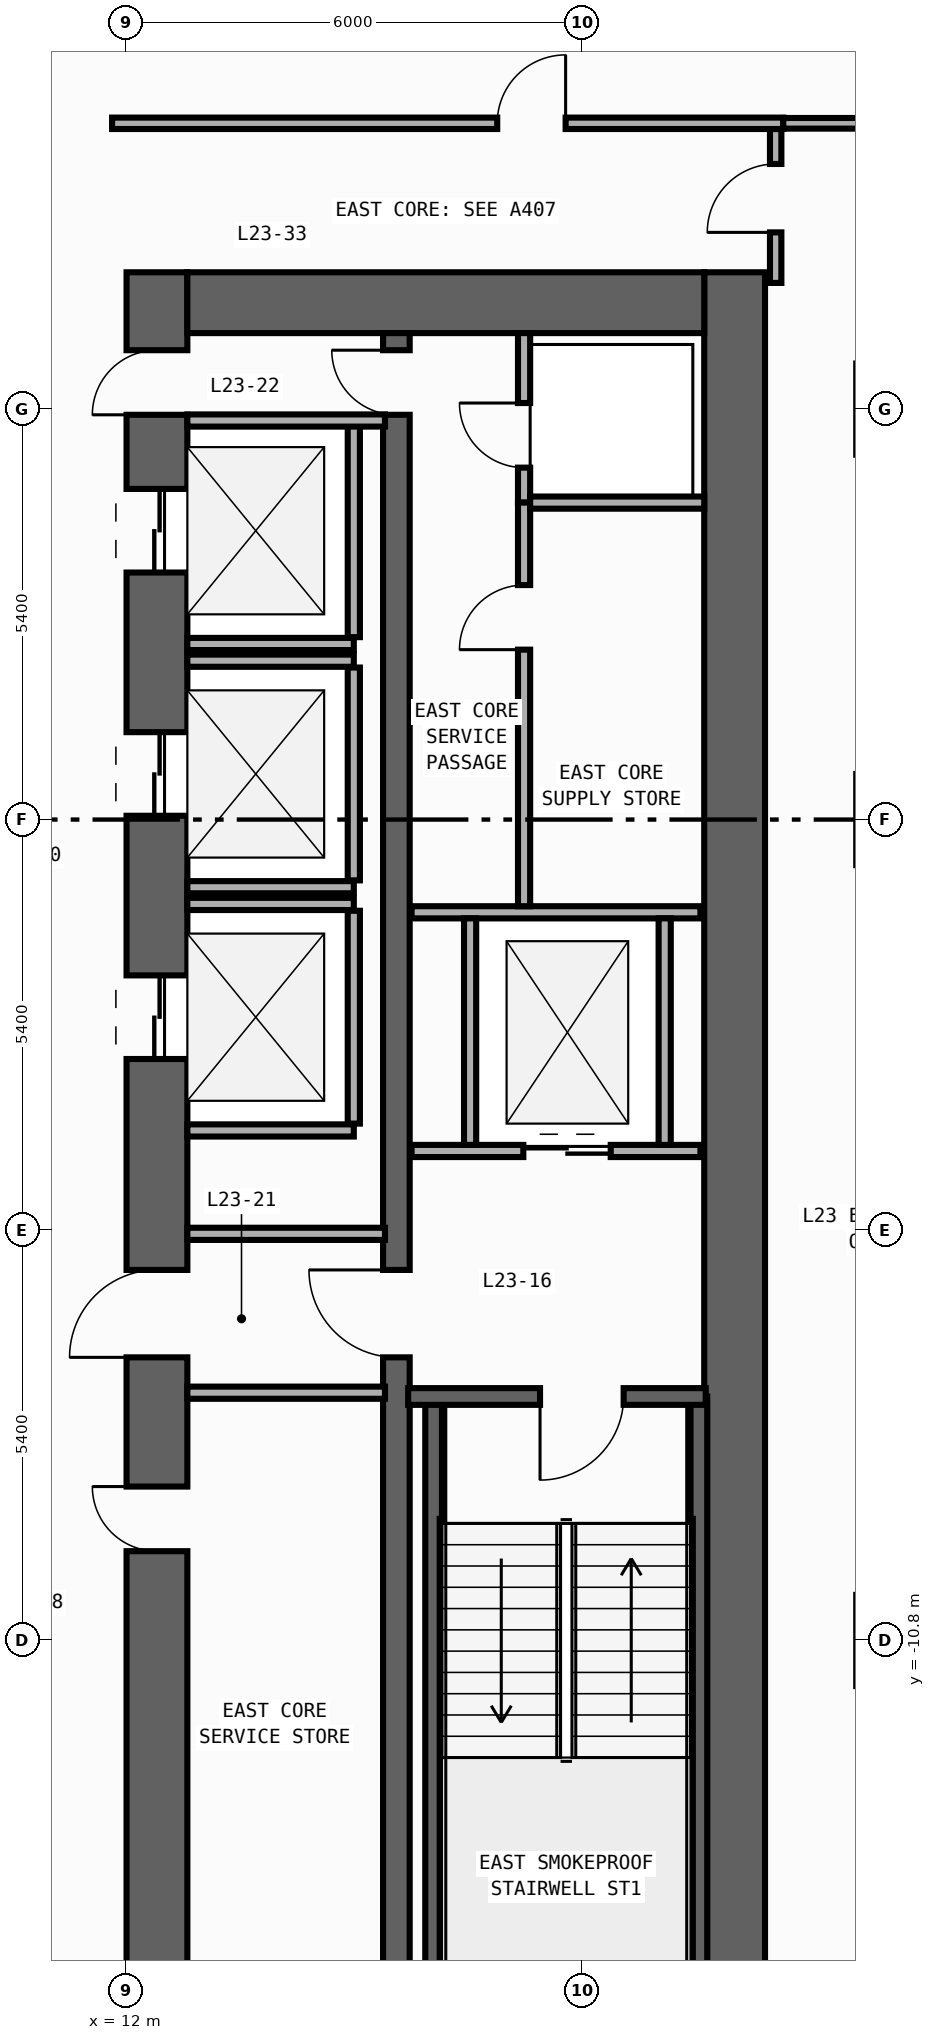
"""IFC4 building model, lengths in metres.
Left out: names, types, materials, properties, quantities, classifications, styles, units other than length and angle.
Written with IfcOpenShell. Run it as: python <this file> out.ifc"""

import sys

from ifc_helpers import new_model, si_unit, direction, frame, frame_2d, origin, origin_2d, place, context, subcontext, project, spatial, rectangle, extrude, element, fill, save


model = new_model("IFC4")
c1 = context("Model", 3, precision=1e-05, world=origin(), true_north=direction((0.0, 1.0)))
c2 = subcontext(c1, "Body", "Model", "MODEL_VIEW")
j1 = project(units=[si_unit("LENGTHUNIT", "METRE"), si_unit("PLANEANGLEUNIT", "RADIAN")], contexts=[c1])
p1 = place(None, origin())
s1 = spatial("IfcSite", under=j1, at=p1, CompositionType="ELEMENT")
p2 = place(p1, origin())
s2 = spatial("IfcBuilding", under=s1, at=p2, CompositionType="ELEMENT")
p3 = place(p2, frame((0.0, 0.0, 101.6)))
s3 = spatial("IfcBuildingStorey", under=s2, at=p3, CompositionType="ELEMENT", Elevation=101.6)
p4 = place(p3, frame((12.4, -19.8, 0.0), z_axis=(0.0, 0.0, 1.0), x_axis=(0.0, 1.0, 0.0)))
e1 = element("IfcWall", 1, at=p4, inside=s3, PredefinedType="SHEAR", context=c2, shape_type="SweptSolid", body=[
    extrude(rectangle(XDim=27.0, YDim=0.8, at=frame_2d((13.5, 0.0))), origin(), (0.0, 0.0, 1.0), 3.94),
])
p5 = place(p4, frame((23.05, 0.0, 0.0)))
e2 = element("IfcOpeningElement", 2, at=p5, cuts=e1, PredefinedType="OPENING", context=c2, shape_type="SweptSolid", body=[
    extrude(rectangle(XDim=1.1, YDim=2.2, at=frame_2d((0.55, 1.1))), frame((0.0, 0.41, 0.0), z_axis=(0.0, -1.0, 0.0), x_axis=(1.0, 0.0, 0.0)), (0.0, 0.0, 1.0), 0.82),
])
p6 = place(p4, frame((19.85, 0.0, 0.0)))
e3 = element("IfcOpeningElement", 3, at=p6, cuts=e1, PredefinedType="OPENING", context=c2, shape_type="SweptSolid", body=[
    extrude(rectangle(XDim=1.1, YDim=2.2, at=frame_2d((0.55, 1.1))), frame((0.0, 0.41, 0.0), z_axis=(0.0, -1.0, 0.0), x_axis=(1.0, 0.0, 0.0)), (0.0, 0.0, 1.0), 0.82),
])
p7 = place(p4, frame((16.65, 0.0, 0.0)))
e4 = element("IfcOpeningElement", 4, at=p7, cuts=e1, PredefinedType="OPENING", context=c2, shape_type="SweptSolid", body=[
    extrude(rectangle(XDim=1.1, YDim=2.2, at=frame_2d((0.55, 1.1))), frame((0.0, 0.41, 0.0), z_axis=(0.0, -1.0, 0.0), x_axis=(1.0, 0.0, 0.0)), (0.0, 0.0, 1.0), 0.82),
])
p8 = place(p4, frame((10.175, 0.0, 0.0)))
e5 = element("IfcOpeningElement", 5, at=p8, cuts=e1, PredefinedType="OPENING", context=c2, shape_type="SweptSolid", body=[
    extrude(rectangle(XDim=0.85, YDim=2.1, at=frame_2d((0.425, 1.05))), frame((0.0, 0.41, 0.0), z_axis=(0.0, -1.0, 0.0), x_axis=(1.0, 0.0, 0.0)), (0.0, 0.0, 1.0), 0.82),
])
p9 = place(p4, frame((12.725, 0.0, 0.0)))
e6 = element("IfcOpeningElement", 6, at=p9, cuts=e1, PredefinedType="OPENING", context=c2, shape_type="SweptSolid", body=[
    extrude(rectangle(XDim=1.15, YDim=2.2, at=frame_2d((0.575, 1.1))), frame((0.0, 0.41, 0.0), z_axis=(0.0, -1.0, 0.0), x_axis=(1.0, 0.0, 0.0)), (0.0, 0.0, 1.0), 0.82),
])
p10 = place(p4, frame((25.125, 0.0, 0.0)))
e7 = element("IfcOpeningElement", 7, at=p10, cuts=e1, PredefinedType="OPENING", context=c2, shape_type="SweptSolid", body=[
    extrude(rectangle(XDim=0.85, YDim=2.1, at=frame_2d((0.425, 1.05))), frame((0.0, 0.41, 0.0), z_axis=(0.0, -1.0, 0.0), x_axis=(1.0, 0.0, 0.0)), (0.0, 0.0, 1.0), 0.82),
])
p11 = place(p3, frame((20.0, -19.8, 0.0), z_axis=(0.0, 0.0, 1.0), x_axis=(0.0, 1.0, 0.0)))
e8 = element("IfcWall", 8, at=p11, inside=s3, PredefinedType="SHEAR", context=c2, shape_type="SweptSolid", body=[
    extrude(rectangle(XDim=27.0, YDim=0.8, at=frame_2d((13.5, 0.0))), origin(), (0.0, 0.0, 1.0), 3.94),
])
p12 = place(p3, frame((12.8, 6.8, 0.0), z_axis=(0.0, 0.0, 1.0), x_axis=(1.0, 0.0, 0.0)))
e9 = element("IfcWall", 9, at=p12, inside=s3, PredefinedType="SHEAR", context=c2, shape_type="SweptSolid", body=[
    extrude(rectangle(XDim=6.8, YDim=0.8, at=frame_2d((3.4, 0.0))), origin(), (0.0, 0.0, 1.0), 3.94),
])
p13 = place(p3, frame((15.55, -19.0, 0.0), z_axis=(0.0, 0.0, 1.0), x_axis=(0.0, 1.0, 0.0)))
e10 = element("IfcWall", 10, at=p13, inside=s3, PredefinedType="SHEAR", context=c2, shape_type="SweptSolid", body=[
    extrude(rectangle(XDim=25.4, YDim=0.35, at=frame_2d((12.7, 0.0))), origin(), (0.0, 0.0, 1.0), 3.94),
])
p14 = place(p13, frame((11.925, 0.0, 0.0)))
e11 = element("IfcOpeningElement", 11, at=p14, cuts=e10, PredefinedType="OPENING", context=c2, shape_type="SweptSolid", body=[
    extrude(rectangle(XDim=1.15, YDim=2.2, at=frame_2d((0.575, 1.1))), frame((0.0, 0.185, 0.0), z_axis=(0.0, -1.0, 0.0), x_axis=(1.0, 0.0, 0.0)), (0.0, 0.0, 1.0), 0.37),
])
p15 = place(p13, frame((24.325, 0.0, 0.0)))
e12 = element("IfcOpeningElement", 12, at=p15, cuts=e10, PredefinedType="OPENING", context=c2, shape_type="SweptSolid", body=[
    extrude(rectangle(XDim=0.85, YDim=2.1, at=frame_2d((0.425, 1.05))), frame((0.0, 0.185, 0.0), z_axis=(0.0, -1.0, 0.0), x_axis=(1.0, 0.0, 0.0)), (0.0, 0.0, 1.0), 0.37),
])
for number, where, z_axis, x_axis in (
    (13, (16.04, -18.89, 0.0), (0.0, 0.0, 1.0), (0.0, 1.0, 0.0)),
    (14, (19.53, -18.89, 0.0), (0.0, 0.0, 1.0), (0.0, 1.0, 0.0)),
):
    element("IfcWall", number, at=place(p3, frame(where, z_axis=z_axis, x_axis=x_axis)), inside=s3, PredefinedType="SHEAR", context=c2, shape_type="SweptSolid", body=[
        extrude(rectangle(XDim=11.3, YDim=0.22, at=frame_2d((5.65, 0.0))), origin(), (0.0, 0.0, 1.0), 3.94),
    ])
p16 = place(p3, frame((19.62, -7.59, 0.0), z_axis=(0.0, 0.0, 1.0), x_axis=(-1.0, 0.0, 0.0)))
e15 = element("IfcWall", 15, at=p16, inside=s3, PredefinedType="SHEAR", context=c2, shape_type="SweptSolid", body=[
    extrude(rectangle(XDim=3.915, YDim=0.22, at=frame_2d((1.958, 0.0))), origin(), (0.0, 0.0, 1.0), 3.94),
])
p17 = place(p16, frame((1.08, 0.0, 0.0)))
e16 = element("IfcOpeningElement", 16, at=p17, cuts=e15, PredefinedType="OPENING", context=c2, shape_type="SweptSolid", body=[
    extrude(rectangle(XDim=1.1, YDim=2.2, at=frame_2d((0.55, 1.1))), frame((0.0, 0.12, 0.0), z_axis=(0.0, -1.0, 0.0), x_axis=(1.0, 0.0, 0.0)), (0.0, 0.0, 1.0), 0.24),
])
for number, where, z_axis, x_axis in (
    (17, (22.2, -10.8, 0.0), (0.0, 0.0, 1.0), (1.0, 0.0, 0.0)),
    (18, (22.2, 0.0, 0.0), (0.0, 0.0, 1.0), (1.0, 0.0, 0.0)),
    (19, (22.2, 5.4, 0.0), (0.0, 0.0, 1.0), (1.0, 0.0, 0.0)),
):
    element("IfcColumn", number, at=place(p3, frame(where, z_axis=z_axis, x_axis=x_axis)), inside=s3, PredefinedType="COLUMN", context=c2, shape_type="SweptSolid", body=[
        extrude(rectangle(XDim=1.2, YDim=1.2, at=origin_2d()), origin(), (0.0, 0.0, 1.0), 4.2),
    ])
p18 = place(p3, frame((12.8, 2.31, 0.0), z_axis=(0.0, 0.0, 1.0), x_axis=(1.0, 0.0, 0.0)))
e20 = element("IfcWall", 20, at=p18, inside=s3, PredefinedType="STANDARD", context=c2, shape_type="SweptSolid", body=[
    extrude(rectangle(XDim=2.19, YDim=0.16, at=frame_2d((1.095, 0.0))), origin(), (0.0, 0.0, 1.0), 3.94),
])
p19 = place(p3, frame((14.99, 2.4, 0.0), z_axis=(0.0, 0.0, 1.0), x_axis=(0.0, 1.0, 0.0)))
e21 = element("IfcWall", 21, at=p19, inside=s3, PredefinedType="STANDARD", context=c2, shape_type="SweptSolid", body=[
    extrude(rectangle(XDim=2.8, YDim=0.16, at=frame_2d((1.4, 0.0))), origin(), (0.0, 0.0, 1.0), 3.94),
])
for number, where, z_axis, x_axis in (
    (22, (12.8, -0.89, 0.0), (0.0, 0.0, 1.0), (1.0, 0.0, 0.0)),
    (23, (12.8, 2.09, 0.0), (0.0, 0.0, 1.0), (1.0, 0.0, 0.0)),
):
    element("IfcWall", number, at=place(p3, frame(where, z_axis=z_axis, x_axis=x_axis)), inside=s3, PredefinedType="STANDARD", context=c2, shape_type="SweptSolid", body=[
        extrude(rectangle(XDim=2.19, YDim=0.16, at=frame_2d((1.095, 0.0))), origin(), (0.0, 0.0, 1.0), 3.94),
    ])
p20 = place(p3, frame((14.99, -0.8, 0.0), z_axis=(0.0, 0.0, 1.0), x_axis=(0.0, 1.0, 0.0)))
e24 = element("IfcWall", 24, at=p20, inside=s3, PredefinedType="STANDARD", context=c2, shape_type="SweptSolid", body=[
    extrude(rectangle(XDim=2.8, YDim=0.16, at=frame_2d((1.4, 0.0))), origin(), (0.0, 0.0, 1.0), 3.94),
])
for number, where, z_axis, x_axis in (
    (25, (12.8, -4.09, 0.0), (0.0, 0.0, 1.0), (1.0, 0.0, 0.0)),
    (26, (12.8, -1.11, 0.0), (0.0, 0.0, 1.0), (1.0, 0.0, 0.0)),
):
    element("IfcWall", number, at=place(p3, frame(where, z_axis=z_axis, x_axis=x_axis)), inside=s3, PredefinedType="STANDARD", context=c2, shape_type="SweptSolid", body=[
        extrude(rectangle(XDim=2.19, YDim=0.16, at=frame_2d((1.095, 0.0))), origin(), (0.0, 0.0, 1.0), 3.94),
    ])
p21 = place(p3, frame((14.99, -4.0, 0.0), z_axis=(0.0, 0.0, 1.0), x_axis=(0.0, 1.0, 0.0)))
e27 = element("IfcWall", 27, at=p21, inside=s3, PredefinedType="STANDARD", context=c2, shape_type="SweptSolid", body=[
    extrude(rectangle(XDim=2.8, YDim=0.16, at=frame_2d((1.4, 0.0))), origin(), (0.0, 0.0, 1.0), 3.94),
])
p22 = place(p3, frame((15.75, -4.36, 0.0), z_axis=(0.0, 0.0, 1.0), x_axis=(1.0, 0.0, 0.0)))
e28 = element("IfcWall", 28, at=p22, inside=s3, PredefinedType="STANDARD", context=c2, shape_type="SweptSolid", body=[
    extrude(rectangle(XDim=3.8, YDim=0.16, at=frame_2d((1.9, 0.0))), origin(), (0.0, 0.0, 1.0), 3.94),
])
p23 = place(p22, frame((1.47, 0.0, 0.0)))
e29 = element("IfcOpeningElement", 29, at=p23, cuts=e28, PredefinedType="OPENING", context=c2, shape_type="SweptSolid", body=[
    extrude(rectangle(XDim=1.15, YDim=2.2, at=frame_2d((0.575, 1.1))), frame((0.0, 0.09, 0.0), z_axis=(0.0, -1.0, 0.0), x_axis=(1.0, 0.0, 0.0)), (0.0, 0.0, 1.0), 0.18),
])
p24 = place(p3, frame((15.75, -1.22, 0.0), z_axis=(0.0, 0.0, 1.0), x_axis=(1.0, 0.0, 0.0)))
e30 = element("IfcWall", 30, at=p24, inside=s3, PredefinedType="STANDARD", context=c2, shape_type="SweptSolid", body=[
    extrude(rectangle(XDim=3.8, YDim=0.16, at=frame_2d((1.9, 0.0))), origin(), (0.0, 0.0, 1.0), 3.94),
])
for number, where, z_axis, x_axis in (
    (31, (16.52, -4.28, 0.0), (0.0, 0.0, 1.0), (0.0, 1.0, 0.0)),
    (32, (19.08, -4.28, 0.0), (0.0, 0.0, 1.0), (0.0, 1.0, 0.0)),
):
    element("IfcWall", number, at=place(p3, frame(where, z_axis=z_axis, x_axis=x_axis)), inside=s3, PredefinedType="STANDARD", context=c2, shape_type="SweptSolid", body=[
        extrude(rectangle(XDim=2.98, YDim=0.16, at=frame_2d((1.49, 0.0))), origin(), (0.0, 0.0, 1.0), 3.94),
    ])
for number, where, z_axis, x_axis in (
    (33, (12.8, -5.45, 0.0), (0.0, 0.0, 1.0), (1.0, 0.0, 0.0)),
    (34, (12.8, -7.54, 0.0), (0.0, 0.0, 1.0), (1.0, 0.0, 0.0)),
    (35, (12.8, 5.25, 0.0), (0.0, 0.0, 1.0), (1.0, 0.0, 0.0)),
):
    element("IfcWall", number, at=place(p3, frame(where, z_axis=z_axis, x_axis=x_axis)), inside=s3, PredefinedType="STANDARD", context=c2, shape_type="SweptSolid", body=[
        extrude(rectangle(XDim=2.6, YDim=0.16, at=frame_2d((1.3, 0.0))), origin(), (0.0, 0.0, 1.0), 3.94),
    ])
p25 = place(p3, frame((17.23, 4.17, 0.0), z_axis=(0.0, 0.0, 1.0), x_axis=(0.0, 1.0, 0.0)))
e36 = element("IfcWall", 36, at=p25, inside=s3, PredefinedType="PARTITIONING", context=c2, shape_type="SweptSolid", body=[
    extrude(rectangle(XDim=2.23, YDim=0.16, at=frame_2d((1.115, 0.0))), origin(), (0.0, 0.0, 1.0), 3.94),
])
p26 = place(p25, frame((0.46, 0.0, 0.0)))
e37 = element("IfcOpeningElement", 37, at=p26, cuts=e36, PredefinedType="OPENING", context=c2, shape_type="SweptSolid", body=[
    extrude(rectangle(XDim=0.85, YDim=2.1, at=frame_2d((0.425, 1.05))), frame((0.0, 0.09, 0.0), z_axis=(0.0, -1.0, 0.0), x_axis=(1.0, 0.0, 0.0)), (0.0, 0.0, 1.0), 0.18),
])
p27 = place(p3, frame((17.23, -1.14, 0.0), z_axis=(0.0, 0.0, 1.0), x_axis=(0.0, 1.0, 0.0)))
e38 = element("IfcWall", 38, at=p27, inside=s3, PredefinedType="PARTITIONING", context=c2, shape_type="SweptSolid", body=[
    extrude(rectangle(XDim=5.31, YDim=0.16, at=frame_2d((2.655, 0.0))), origin(), (0.0, 0.0, 1.0), 3.94),
])
p28 = place(p27, frame((3.375, 0.0, 0.0)))
e39 = element("IfcOpeningElement", 39, at=p28, cuts=e38, PredefinedType="OPENING", context=c2, shape_type="SweptSolid", body=[
    extrude(rectangle(XDim=0.85, YDim=2.1, at=frame_2d((0.425, 1.05))), frame((0.0, 0.09, 0.0), z_axis=(0.0, -1.0, 0.0), x_axis=(1.0, 0.0, 0.0)), (0.0, 0.0, 1.0), 0.18),
])
p29 = place(p3, frame((17.31, 4.17, 0.0), z_axis=(0.0, 0.0, 1.0), x_axis=(1.0, 0.0, 0.0)))
e40 = element("IfcWall", 40, at=p29, inside=s3, PredefinedType="PARTITIONING", context=c2, shape_type="SweptSolid", body=[
    extrude(rectangle(XDim=2.29, YDim=0.16, at=frame_2d((1.145, 0.0))), origin(), (0.0, 0.0, 1.0), 3.94),
])
p30 = place(p3, frame((20.54, 7.06, 0.0), z_axis=(0.0, 0.0, 1.0), x_axis=(0.0, 1.0, 0.0)))
e41 = element("IfcWall", 41, at=p30, inside=s3, PredefinedType="PARTITIONING", context=c2, shape_type="SweptSolid", body=[
    extrude(rectangle(XDim=2.025, YDim=0.15, at=frame_2d((1.012, 0.0))), origin(), (0.0, 0.0, 1.0), 3.94),
])
p31 = place(p30, frame((0.665, 0.0, 0.0)))
e42 = element("IfcOpeningElement", 42, at=p31, cuts=e41, PredefinedType="OPENING", context=c2, shape_type="SweptSolid", body=[
    extrude(rectangle(XDim=0.9, YDim=2.15, at=frame_2d((0.45, 1.075))), frame((0.0, 0.085, 0.0), z_axis=(0.0, -1.0, 0.0), x_axis=(1.0, 0.0, 0.0)), (0.0, 0.0, 1.0), 0.17),
])
p32 = place(p3, frame((11.81, 9.16, 0.0), z_axis=(0.0, 0.0, 1.0), x_axis=(1.0, 0.0, 0.0)))
e43 = element("IfcWall", 43, at=p32, inside=s3, PredefinedType="PARTITIONING", context=c2, shape_type="SweptSolid", body=[
    extrude(rectangle(XDim=8.83, YDim=0.15, at=frame_2d((4.415, 0.0))), origin(), (0.0, 0.0, 1.0), 3.94),
])
p33 = place(p32, frame((5.067, 0.0, 0.0)))
e44 = element("IfcOpeningElement", 44, at=p33, cuts=e43, PredefinedType="OPENING", context=c2, shape_type="SweptSolid", body=[
    extrude(rectangle(XDim=0.9, YDim=2.15, at=frame_2d((0.45, 1.075))), frame((0.0, 0.085, 0.0), z_axis=(0.0, -1.0, 0.0), x_axis=(1.0, 0.0, 0.0)), (0.0, 0.0, 1.0), 0.17),
])
p34 = place(p3, frame((20.64, 9.16, 0.0), z_axis=(0.0, 0.0, 1.0), x_axis=(1.0, 0.0, 0.0)))
e45 = element("IfcWall", 45, at=p34, inside=s3, PredefinedType="PARTITIONING", context=c2, shape_type="SweptSolid", body=[
    extrude(rectangle(XDim=2.815, YDim=0.14, at=frame_2d((1.408, 0.0))), origin(), (0.0, 0.0, 1.0), 3.94),
])
p35 = place(p17, origin())
e46 = element("IfcDoor", 46, at=p35, inside=s3, OperationType="SINGLE_SWING_RIGHT", PredefinedType="DOOR", context=c2, shape_type="SweptSolid", body=[
    extrude(rectangle(XDim=1.1, YDim=2.2, at=frame_2d((0.55, 1.1))), frame((0.0, 0.025, 0.0), z_axis=(0.0, -1.0, 0.0), x_axis=(1.0, 0.0, 0.0)), (0.0, 0.0, 1.0), 0.05),
])
fill(e16, e46)
p36 = place(p5, origin())
e47 = element("IfcDoor", 47, at=p36, inside=s3, OperationType="DOUBLE_DOOR_SLIDING", PredefinedType="DOOR", context=c2, shape_type="SweptSolid", body=[
    extrude(rectangle(XDim=1.1, YDim=2.2, at=frame_2d((0.55, 1.1))), frame((0.0, 0.025, 0.0), z_axis=(0.0, -1.0, 0.0), x_axis=(1.0, 0.0, 0.0)), (0.0, 0.0, 1.0), 0.05),
])
fill(e2, e47)
p37 = place(p6, origin())
e48 = element("IfcDoor", 48, at=p37, inside=s3, OperationType="DOUBLE_DOOR_SLIDING", PredefinedType="DOOR", context=c2, shape_type="SweptSolid", body=[
    extrude(rectangle(XDim=1.1, YDim=2.2, at=frame_2d((0.55, 1.1))), frame((0.0, 0.025, 0.0), z_axis=(0.0, -1.0, 0.0), x_axis=(1.0, 0.0, 0.0)), (0.0, 0.0, 1.0), 0.05),
])
fill(e3, e48)
p38 = place(p7, origin())
e49 = element("IfcDoor", 49, at=p38, inside=s3, OperationType="DOUBLE_DOOR_SLIDING", PredefinedType="DOOR", context=c2, shape_type="SweptSolid", body=[
    extrude(rectangle(XDim=1.1, YDim=2.2, at=frame_2d((0.55, 1.1))), frame((0.0, 0.025, 0.0), z_axis=(0.0, -1.0, 0.0), x_axis=(1.0, 0.0, 0.0)), (0.0, 0.0, 1.0), 0.05),
])
fill(e4, e49)
p39 = place(p8, origin())
e50 = element("IfcDoor", 50, at=p39, inside=s3, OperationType="SINGLE_SWING_RIGHT", PredefinedType="DOOR", context=c2, shape_type="SweptSolid", body=[
    extrude(rectangle(XDim=0.85, YDim=2.1, at=frame_2d((0.425, 1.05))), frame((0.0, 0.025, 0.0), z_axis=(0.0, -1.0, 0.0), x_axis=(1.0, 0.0, 0.0)), (0.0, 0.0, 1.0), 0.05),
])
fill(e5, e50)
p40 = place(p9, origin())
e51 = element("IfcDoor", 51, at=p40, inside=s3, OperationType="SINGLE_SWING_LEFT", PredefinedType="DOOR", context=c2, shape_type="SweptSolid", body=[
    extrude(rectangle(XDim=1.15, YDim=2.2, at=frame_2d((0.575, 1.1))), frame((0.0, 0.025, 0.0), z_axis=(0.0, -1.0, 0.0), x_axis=(1.0, 0.0, 0.0)), (0.0, 0.0, 1.0), 0.05),
])
fill(e6, e51)
p41 = place(p14, origin())
e52 = element("IfcDoor", 52, at=p41, inside=s3, OperationType="SINGLE_SWING_RIGHT", PredefinedType="DOOR", context=c2, shape_type="SweptSolid", body=[
    extrude(rectangle(XDim=1.15, YDim=2.2, at=frame_2d((0.575, 1.1))), frame((0.0, 0.025, 0.0), z_axis=(0.0, -1.0, 0.0), x_axis=(1.0, 0.0, 0.0)), (0.0, 0.0, 1.0), 0.05),
])
fill(e11, e52)
p42 = place(p10, origin())
e53 = element("IfcDoor", 53, at=p42, inside=s3, OperationType="SINGLE_SWING_LEFT", PredefinedType="DOOR", context=c2, shape_type="SweptSolid", body=[
    extrude(rectangle(XDim=0.85, YDim=2.1, at=frame_2d((0.425, 1.05))), frame((0.0, 0.025, 0.0), z_axis=(0.0, -1.0, 0.0), x_axis=(1.0, 0.0, 0.0)), (0.0, 0.0, 1.0), 0.05),
])
fill(e7, e53)
p43 = place(p15, origin())
e54 = element("IfcDoor", 54, at=p43, inside=s3, OperationType="SINGLE_SWING_RIGHT", PredefinedType="DOOR", context=c2, shape_type="SweptSolid", body=[
    extrude(rectangle(XDim=0.85, YDim=2.1, at=frame_2d((0.425, 1.05))), frame((0.0, 0.025, 0.0), z_axis=(0.0, -1.0, 0.0), x_axis=(1.0, 0.0, 0.0)), (0.0, 0.0, 1.0), 0.05),
])
fill(e12, e54)
p44 = place(p23, origin())
e55 = element("IfcDoor", 55, at=p44, inside=s3, OperationType="DOUBLE_DOOR_SLIDING", PredefinedType="DOOR", context=c2, shape_type="SweptSolid", body=[
    extrude(rectangle(XDim=1.15, YDim=2.2, at=frame_2d((0.575, 1.1))), frame((0.0, 0.025, 0.0), z_axis=(0.0, -1.0, 0.0), x_axis=(1.0, 0.0, 0.0)), (0.0, 0.0, 1.0), 0.05),
])
fill(e29, e55)
p45 = place(p26, origin())
e56 = element("IfcDoor", 56, at=p45, inside=s3, OperationType="SINGLE_SWING_RIGHT", PredefinedType="DOOR", context=c2, shape_type="SweptSolid", body=[
    extrude(rectangle(XDim=0.85, YDim=2.1, at=frame_2d((0.425, 1.05))), frame((0.0, 0.025, 0.0), z_axis=(0.0, -1.0, 0.0), x_axis=(1.0, 0.0, 0.0)), (0.0, 0.0, 1.0), 0.05),
])
fill(e37, e56)
p46 = place(p28, origin())
e57 = element("IfcDoor", 57, at=p46, inside=s3, OperationType="SINGLE_SWING_LEFT", PredefinedType="DOOR", context=c2, shape_type="SweptSolid", body=[
    extrude(rectangle(XDim=0.85, YDim=2.1, at=frame_2d((0.425, 1.05))), frame((0.0, 0.025, 0.0), z_axis=(0.0, -1.0, 0.0), x_axis=(1.0, 0.0, 0.0)), (0.0, 0.0, 1.0), 0.05),
])
fill(e39, e57)
p47 = place(p31, origin())
e58 = element("IfcDoor", 58, at=p47, inside=s3, OperationType="SINGLE_SWING_LEFT", PredefinedType="DOOR", context=c2, shape_type="SweptSolid", body=[
    extrude(rectangle(XDim=0.9, YDim=2.15, at=frame_2d((0.45, 1.075))), frame((0.0, 0.025, 0.0), z_axis=(0.0, -1.0, 0.0), x_axis=(1.0, 0.0, 0.0)), (0.0, 0.0, 1.0), 0.05),
])
fill(e42, e58)
p48 = place(p33, origin())
e59 = element("IfcDoor", 59, at=p48, inside=s3, OperationType="SINGLE_SWING_RIGHT", PredefinedType="DOOR", context=c2, shape_type="SweptSolid", body=[
    extrude(rectangle(XDim=0.9, YDim=2.15, at=frame_2d((0.45, 1.075))), frame((0.0, 0.025, 0.0), z_axis=(0.0, -1.0, 0.0), x_axis=(1.0, 0.0, 0.0)), (0.0, 0.0, 1.0), 0.05),
])
fill(e44, e59)
save(model, sys.argv[1])
